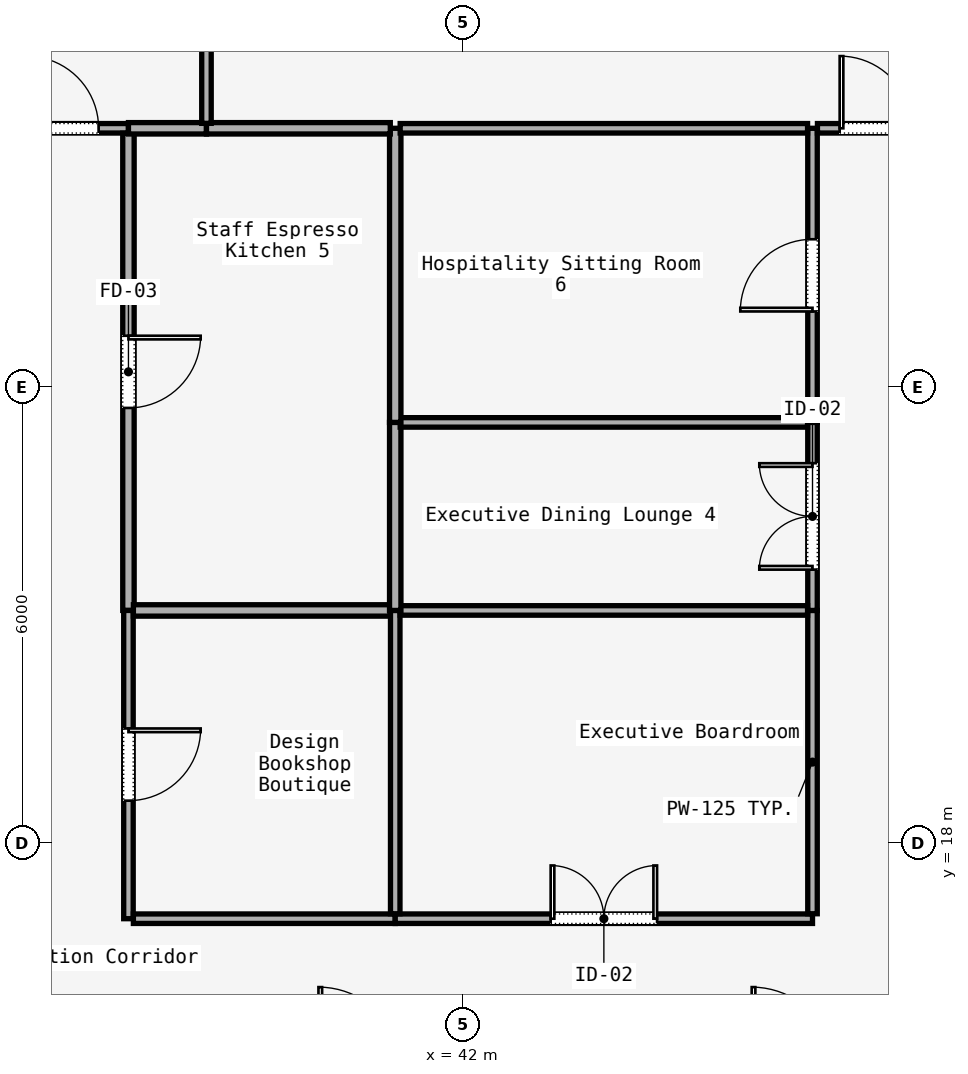
"""IFC4 building model, lengths in metres.
Left out: names, types, materials, properties, quantities, classifications, styles, units other than length and angle.
Written with IfcOpenShell. Run it as: python <this file> out.ifc"""

import sys

from ifc_helpers import new_model, si_unit, direction, frame, frame_2d, origin, place, context, subcontext, project, spatial, rectangle, extrude, element, fill, save


model = new_model("IFC4")
c1 = context("Model", 3, precision=1e-05, world=origin(), true_north=direction((0.0, 1.0)))
c2 = subcontext(c1, "Body", "Model", "MODEL_VIEW")
j1 = project(units=[si_unit("LENGTHUNIT", "METRE"), si_unit("PLANEANGLEUNIT", "RADIAN")], contexts=[c1])
p1 = place(None, origin())
s1 = spatial("IfcSite", under=j1, at=p1, CompositionType="ELEMENT")
p2 = place(p1, origin())
s2 = spatial("IfcBuilding", under=s1, at=p2, CompositionType="ELEMENT")
p3 = place(p2, frame((0.0, 0.0, 195.4)))
s3 = spatial("IfcBuildingStorey", under=s2, at=p3, CompositionType="ELEMENT", Elevation=195.4)
p4 = place(p3, frame((35.865, 27.4, 0.0), z_axis=(0.0, 0.0, 1.0), x_axis=(1.0, 0.0, 0.0)))
e1 = element("IfcWall", 1, at=p4, inside=s3, PredefinedType="PARTITIONING", context=c2, shape_type="SweptSolid", body=[
    extrude(rectangle(XDim=1.735, YDim=0.125, at=frame_2d((0.868, 0.0))), origin(), (0.0, 0.0, 1.0), 3.01),
])
p5 = place(p4, frame((0.393, 0.0, 0.0)))
e2 = element("IfcOpeningElement", 2, at=p5, cuts=e1, PredefinedType="OPENING", context=c2, shape_type="SweptSolid", body=[
    extrude(rectangle(XDim=0.95, YDim=2.2, at=frame_2d((0.475, 1.1))), frame((0.0, 0.062, 0.0), z_axis=(0.0, -1.0, 0.0), x_axis=(1.0, 0.0, 0.0)), (0.0, 0.0, 1.0), 0.125),
])
p6 = place(p3, frame((37.6, 27.335, 0.0), z_axis=(0.0, 0.0, 1.0), x_axis=(0.0, -1.0, 0.0)))
e3 = element("IfcWall", 3, at=p6, inside=s3, PredefinedType="PARTITIONING", context=c2, shape_type="SweptSolid", body=[
    extrude(rectangle(XDim=6.279, YDim=0.15, at=frame_2d((3.14, 0.0))), origin(), (0.0, 0.0, 1.0), 3.01),
])
p7 = place(p6, frame((2.665, 0.0, 0.0)))
e4 = element("IfcOpeningElement", 4, at=p7, cuts=e3, PredefinedType="OPENING", context=c2, shape_type="SweptSolid", body=[
    extrude(rectangle(XDim=0.95, YDim=2.2, at=frame_2d((0.475, 1.1))), frame((0.0, 0.075, 0.0), z_axis=(0.0, -1.0, 0.0), x_axis=(1.0, 0.0, 0.0)), (0.0, 0.0, 1.0), 0.15),
])
p8 = place(p3, frame((37.6, 21.056, 0.0), z_axis=(0.0, 0.0, 1.0), x_axis=(0.0, -1.0, 0.0)))
e5 = element("IfcWall", 5, at=p8, inside=s3, PredefinedType="PARTITIONING", context=c2, shape_type="SweptSolid", body=[
    extrude(rectangle(XDim=4.056, YDim=0.125, at=frame_2d((2.028, 0.0))), origin(), (0.0, 0.0, 1.0), 3.01),
])
p9 = place(p8, frame((1.553, 0.0, 0.0)))
e6 = element("IfcOpeningElement", 6, at=p9, cuts=e5, PredefinedType="OPENING", context=c2, shape_type="SweptSolid", body=[
    extrude(rectangle(XDim=0.95, YDim=2.2, at=frame_2d((0.475, 1.1))), frame((0.0, 0.062, 0.0), z_axis=(0.0, -1.0, 0.0), x_axis=(1.0, 0.0, 0.0)), (0.0, 0.0, 1.0), 0.125),
])
p10 = place(p3, frame((37.665, 17.0, 0.0), z_axis=(0.0, 0.0, 1.0), x_axis=(1.0, 0.0, 0.0)))
e7 = element("IfcWall", 7, at=p10, inside=s3, PredefinedType="PARTITIONING", context=c2, shape_type="SweptSolid", body=[
    extrude(rectangle(XDim=3.445, YDim=0.125, at=frame_2d((1.723, 0.0))), origin(), (0.0, 0.0, 1.0), 3.01),
])
p11 = place(p3, frame((41.11, 17.0, 0.0), z_axis=(0.0, 0.0, 1.0), x_axis=(1.0, 0.0, 0.0)))
e8 = element("IfcWall", 8, at=p11, inside=s3, PredefinedType="PARTITIONING", context=c2, shape_type="SweptSolid", body=[
    extrude(rectangle(XDim=5.49, YDim=0.125, at=frame_2d((2.745, 0.0))), origin(), (0.0, 0.0, 1.0), 3.01),
])
p12 = place(p11, frame((2.045, 0.0, 0.0)))
e9 = element("IfcOpeningElement", 9, at=p12, cuts=e8, PredefinedType="OPENING", context=c2, shape_type="SweptSolid", body=[
    extrude(rectangle(XDim=1.4, YDim=2.2, at=frame_2d((0.7, 1.1))), frame((0.0, 0.062, 0.0), z_axis=(0.0, -1.0, 0.0), x_axis=(1.0, 0.0, 0.0)), (0.0, 0.0, 1.0), 0.125),
])
p13 = place(p3, frame((46.6, 17.065, 0.0), z_axis=(0.0, 0.0, 1.0), x_axis=(0.0, 1.0, 0.0)))
e10 = element("IfcWall", 10, at=p13, inside=s3, PredefinedType="PARTITIONING", context=c2, shape_type="SweptSolid", body=[
    extrude(rectangle(XDim=3.991, YDim=0.125, at=frame_2d((1.996, 0.0))), origin(), (0.0, 0.0, 1.0), 3.01),
])
p14 = place(p3, frame((46.6, 21.056, 0.0), z_axis=(0.0, 0.0, 1.0), x_axis=(0.0, 1.0, 0.0)))
e11 = element("IfcWall", 11, at=p14, inside=s3, PredefinedType="PARTITIONING", context=c2, shape_type="SweptSolid", body=[
    extrude(rectangle(XDim=2.474, YDim=0.125, at=frame_2d((1.237, 0.0))), origin(), (0.0, 0.0, 1.0), 3.01),
])
p15 = place(p14, frame((0.537, 0.0, 0.0)))
e12 = element("IfcOpeningElement", 12, at=p15, cuts=e11, PredefinedType="OPENING", context=c2, shape_type="SweptSolid", body=[
    extrude(rectangle(XDim=1.4, YDim=2.2, at=frame_2d((0.7, 1.1))), frame((0.0, 0.062, 0.0), z_axis=(0.0, -1.0, 0.0), x_axis=(1.0, 0.0, 0.0)), (0.0, 0.0, 1.0), 0.125),
])
p16 = place(p3, frame((46.6, 23.53, 0.0), z_axis=(0.0, 0.0, 1.0), x_axis=(0.0, 1.0, 0.0)))
e13 = element("IfcWall", 13, at=p16, inside=s3, PredefinedType="PARTITIONING", context=c2, shape_type="SweptSolid", body=[
    extrude(rectangle(XDim=3.87, YDim=0.125, at=frame_2d((1.935, 0.0))), origin(), (0.0, 0.0, 1.0), 3.01),
])
p17 = place(p16, frame((1.46, 0.0, 0.0)))
e14 = element("IfcOpeningElement", 14, at=p17, cuts=e13, PredefinedType="OPENING", context=c2, shape_type="SweptSolid", body=[
    extrude(rectangle(XDim=0.95, YDim=2.2, at=frame_2d((0.475, 1.1))), frame((0.0, 0.062, 0.0), z_axis=(0.0, -1.0, 0.0), x_axis=(1.0, 0.0, 0.0)), (0.0, 0.0, 1.0), 0.125),
])
p18 = place(p3, frame((46.665, 27.4, 0.0), z_axis=(0.0, 0.0, 1.0), x_axis=(1.0, 0.0, 0.0)))
e15 = element("IfcWall", 15, at=p18, inside=s3, PredefinedType="PARTITIONING", context=c2, shape_type="SweptSolid", body=[
    extrude(rectangle(XDim=1.535, YDim=0.125, at=frame_2d((0.768, 0.0))), origin(), (0.0, 0.0, 1.0), 3.01),
])
p19 = place(p18, frame((0.292, 0.0, 0.0)))
e16 = element("IfcOpeningElement", 16, at=p19, cuts=e15, PredefinedType="OPENING", context=c2, shape_type="SweptSolid", body=[
    extrude(rectangle(XDim=0.95, YDim=2.2, at=frame_2d((0.475, 1.1))), frame((0.0, 0.062, 0.0), z_axis=(0.0, -1.0, 0.0), x_axis=(1.0, 0.0, 0.0)), (0.0, 0.0, 1.0), 0.125),
])
p20 = place(p3, frame((41.11, 21.056, 0.0), z_axis=(0.0, 0.0, 1.0), x_axis=(0.0, -1.0, 0.0)))
e17 = element("IfcWall", 17, at=p20, inside=s3, PredefinedType="PARTITIONING", context=c2, shape_type="SweptSolid", body=[
    extrude(rectangle(XDim=3.991, YDim=0.125, at=frame_2d((1.996, 0.0))), origin(), (0.0, 0.0, 1.0), 3.01),
])
p21 = place(p3, frame((37.665, 21.056, 0.0), z_axis=(0.0, 0.0, 1.0), x_axis=(1.0, 0.0, 0.0)))
e18 = element("IfcWall", 18, at=p21, inside=s3, PredefinedType="PARTITIONING", context=c2, shape_type="SweptSolid", body=[
    extrude(rectangle(XDim=3.38, YDim=0.15, at=frame_2d((1.69, 0.0))), origin(), (0.0, 0.0, 1.0), 3.01),
])
p22 = place(p3, frame((41.175, 21.056, 0.0), z_axis=(0.0, 0.0, 1.0), x_axis=(1.0, 0.0, 0.0)))
e19 = element("IfcWall", 19, at=p22, inside=s3, PredefinedType="PARTITIONING", context=c2, shape_type="SweptSolid", body=[
    extrude(rectangle(XDim=5.36, YDim=0.125, at=frame_2d((2.68, 0.0))), origin(), (0.0, 0.0, 1.0), 3.01),
])
p23 = place(p3, frame((41.11, 21.056, 0.0), z_axis=(0.0, 0.0, 1.0), x_axis=(0.0, 1.0, 0.0)))
e20 = element("IfcWall", 20, at=p23, inside=s3, PredefinedType="PARTITIONING", context=c2, shape_type="SweptSolid", body=[
    extrude(rectangle(XDim=2.474, YDim=0.15, at=frame_2d((1.237, 0.0))), origin(), (0.0, 0.0, 1.0), 3.01),
])
p24 = place(p3, frame((41.175, 23.53, 0.0), z_axis=(0.0, 0.0, 1.0), x_axis=(1.0, 0.0, 0.0)))
e21 = element("IfcWall", 21, at=p24, inside=s3, PredefinedType="PARTITIONING", context=c2, shape_type="SweptSolid", body=[
    extrude(rectangle(XDim=5.36, YDim=0.125, at=frame_2d((2.68, 0.0))), origin(), (0.0, 0.0, 1.0), 3.01),
])
p25 = place(p3, frame((41.11, 27.4, 0.0), z_axis=(0.0, 0.0, 1.0), x_axis=(0.0, -1.0, 0.0)))
e22 = element("IfcWall", 22, at=p25, inside=s3, PredefinedType="PARTITIONING", context=c2, shape_type="SweptSolid", body=[
    extrude(rectangle(XDim=3.87, YDim=0.15, at=frame_2d((1.935, 0.0))), origin(), (0.0, 0.0, 1.0), 3.01),
])
p26 = place(p3, frame((37.6, 27.4, 0.0), z_axis=(0.0, 0.0, 1.0), x_axis=(1.0, 0.0, 0.0)))
e23 = element("IfcWall", 23, at=p26, inside=s3, PredefinedType="PARTITIONING", context=c2, shape_type="SweptSolid", body=[
    extrude(rectangle(XDim=1.026, YDim=0.15, at=frame_2d((0.513, 0.0))), origin(), (0.0, 0.0, 1.0), 3.01),
])
p27 = place(p3, frame((38.626, 27.4, 0.0), z_axis=(0.0, 0.0, 1.0), x_axis=(1.0, 0.0, 0.0)))
e24 = element("IfcWall", 24, at=p27, inside=s3, PredefinedType="PARTITIONING", context=c2, shape_type="SweptSolid", body=[
    extrude(rectangle(XDim=2.418, YDim=0.15, at=frame_2d((1.209, 0.0))), origin(), (0.0, 0.0, 1.0), 3.01),
])
p28 = place(p3, frame((41.175, 27.4, 0.0), z_axis=(0.0, 0.0, 1.0), x_axis=(1.0, 0.0, 0.0)))
e25 = element("IfcWall", 25, at=p28, inside=s3, PredefinedType="PARTITIONING", context=c2, shape_type="SweptSolid", body=[
    extrude(rectangle(XDim=5.36, YDim=0.125, at=frame_2d((2.68, 0.0))), origin(), (0.0, 0.0, 1.0), 3.01),
])
p29 = place(p3, frame((38.626, 46.126, 0.0), z_axis=(0.0, 0.0, 1.0), x_axis=(0.0, -1.0, 0.0)))
e26 = element("IfcWall", 26, at=p29, inside=s3, PredefinedType="PARTITIONING", context=c2, shape_type="SweptSolid", body=[
    extrude(rectangle(XDim=18.661, YDim=0.125, at=frame_2d((9.331, 0.0))), origin(), (0.0, 0.0, 1.0), 3.01),
])
p30 = place(p9, origin())
e27 = element("IfcDoor", 27, at=p30, inside=s3, OperationType="SINGLE_SWING_RIGHT", PredefinedType="DOOR", context=c2, shape_type="SweptSolid", body=[
    extrude(rectangle(XDim=0.95, YDim=2.2, at=frame_2d((0.475, 1.1))), frame((0.0, 0.025, 0.0), z_axis=(0.0, -1.0, 0.0), x_axis=(1.0, 0.0, 0.0)), (0.0, 0.0, 1.0), 0.05),
])
fill(e6, e27)
p31 = place(p12, origin())
e28 = element("IfcDoor", 28, at=p31, inside=s3, OperationType="SINGLE_SWING_LEFT", PredefinedType="DOOR", context=c2, shape_type="SweptSolid", body=[
    extrude(rectangle(XDim=1.4, YDim=2.2, at=frame_2d((0.7, 1.1))), frame((0.0, 0.025, 0.0), z_axis=(0.0, -1.0, 0.0), x_axis=(1.0, 0.0, 0.0)), (0.0, 0.0, 1.0), 0.05),
])
fill(e9, e28)
p32 = place(p15, origin())
e29 = element("IfcDoor", 29, at=p32, inside=s3, OperationType="SINGLE_SWING_RIGHT", PredefinedType="DOOR", context=c2, shape_type="SweptSolid", body=[
    extrude(rectangle(XDim=1.4, YDim=2.2, at=frame_2d((0.7, 1.1))), frame((0.0, 0.025, 0.0), z_axis=(0.0, -1.0, 0.0), x_axis=(1.0, 0.0, 0.0)), (0.0, 0.0, 1.0), 0.05),
])
fill(e12, e29)
p33 = place(p7, origin())
e30 = element("IfcDoor", 30, at=p33, inside=s3, OperationType="SINGLE_SWING_LEFT", PredefinedType="DOOR", context=c2, shape_type="SweptSolid", body=[
    extrude(rectangle(XDim=0.95, YDim=2.2, at=frame_2d((0.475, 1.1))), frame((0.0, 0.025, 0.0), z_axis=(0.0, -1.0, 0.0), x_axis=(1.0, 0.0, 0.0)), (0.0, 0.0, 1.0), 0.05),
])
fill(e4, e30)
p34 = place(p17, origin())
e31 = element("IfcDoor", 31, at=p34, inside=s3, OperationType="SINGLE_SWING_RIGHT", PredefinedType="DOOR", context=c2, shape_type="SweptSolid", body=[
    extrude(rectangle(XDim=0.95, YDim=2.2, at=frame_2d((0.475, 1.1))), frame((0.0, 0.025, 0.0), z_axis=(0.0, -1.0, 0.0), x_axis=(1.0, 0.0, 0.0)), (0.0, 0.0, 1.0), 0.05),
])
fill(e14, e31)
p35 = place(p5, origin())
e32 = element("IfcDoor", 32, at=p35, inside=s3, OperationType="SINGLE_SWING_LEFT", PredefinedType="DOOR", context=c2, shape_type="SweptSolid", body=[
    extrude(rectangle(XDim=0.95, YDim=2.2, at=frame_2d((0.475, 1.1))), frame((0.0, 0.025, 0.0), z_axis=(0.0, -1.0, 0.0), x_axis=(1.0, 0.0, 0.0)), (0.0, 0.0, 1.0), 0.05),
])
fill(e2, e32)
p36 = place(p19, origin())
e33 = element("IfcDoor", 33, at=p36, inside=s3, OperationType="SINGLE_SWING_RIGHT", PredefinedType="DOOR", context=c2, shape_type="SweptSolid", body=[
    extrude(rectangle(XDim=0.95, YDim=2.2, at=frame_2d((0.475, 1.1))), frame((0.0, 0.025, 0.0), z_axis=(0.0, -1.0, 0.0), x_axis=(1.0, 0.0, 0.0)), (0.0, 0.0, 1.0), 0.05),
])
fill(e16, e33)
save(model, sys.argv[1])
